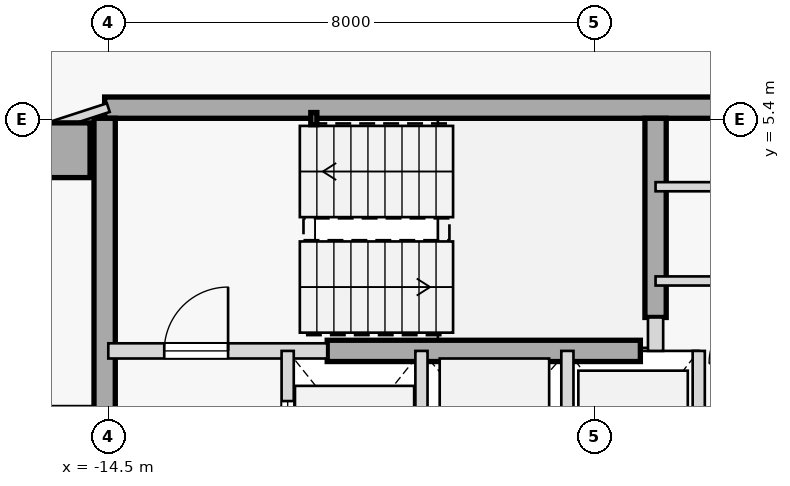
"""IFC4 building model, lengths in metres.
Left out: names, types, materials, properties, quantities, classifications, styles, units other than length and angle.
Written with IfcOpenShell. Run it as: python <this file> out.ifc"""

import sys

from ifc_helpers import new_model, si_unit, direction, frame, frame_2d, origin, origin_2d, place, context, subcontext, project, spatial, rectangle, hollow_rectangle, extrude, element, fill, save


model = new_model("IFC4")
c1 = context("Model", 3, precision=1e-05, world=origin(), true_north=direction((0.0, 1.0)))
c2 = subcontext(c1, "Body", "Model", "MODEL_VIEW")
j1 = project(units=[si_unit("LENGTHUNIT", "METRE"), si_unit("PLANEANGLEUNIT", "RADIAN")], contexts=[c1])
p1 = place(None, origin())
s1 = spatial("IfcSite", under=j1, at=p1, CompositionType="ELEMENT")
p2 = place(p1, origin())
s2 = spatial("IfcBuilding", under=s1, at=p2, CompositionType="ELEMENT")
p3 = place(p2, frame((0.0, 0.0, 210.9)))
s3 = spatial("IfcBuildingStorey", under=s2, at=p3, CompositionType="ELEMENT", Elevation=210.9)
p4 = place(p3, frame((-15.25, 4.9, 0.0), z_axis=(0.0, 0.0, 1.0), x_axis=(1.0, 0.0, 0.0)))
e1 = element("IfcColumn", 1, at=p4, inside=s3, PredefinedType="COLUMN", context=c2, shape_type="SweptSolid", body=[
    extrude(rectangle(XDim=0.9, YDim=0.9, at=origin_2d()), origin(), (0.0, 0.0, 1.0), 3.35),
])
p5 = place(p3, frame((-14.56, 5.6, 0.0), z_axis=(0.0, 0.0, 1.0), x_axis=(1.0, 0.0, 0.0)))
e2 = element("IfcWall", 2, at=p5, inside=s3, PredefinedType="SHEAR", context=c2, shape_type="SweptSolid", body=[
    extrude(rectangle(XDim=11.41, YDim=0.35, at=frame_2d((5.705, 0.0))), origin(), (0.0, 0.0, 1.0), 3.125),
])
p6 = place(p3, frame((-14.56, -5.425, 0.0), z_axis=(0.0, 0.0, 1.0), x_axis=(0.0, 1.0, 0.0)))
e3 = element("IfcWall", 3, at=p6, inside=s3, PredefinedType="SHEAR", context=c2, shape_type="SweptSolid", body=[
    extrude(rectangle(XDim=10.85, YDim=0.35, at=frame_2d((5.425, 0.0))), origin(), (0.0, 0.0, 1.0), 3.125),
])
p7 = place(p3, frame((-5.5, 2.15, 0.0), z_axis=(0.0, 0.0, 1.0), x_axis=(0.0, 1.0, 0.0)))
e4 = element("IfcWall", 4, at=p7, inside=s3, PredefinedType="SHEAR", context=c2, shape_type="SweptSolid", body=[
    extrude(rectangle(XDim=3.275, YDim=0.35, at=frame_2d((1.638, 0.0))), origin(), (0.0, 0.0, 1.0), 3.125),
])
p8 = place(p3, frame((-10.9, 1.6, 0.0), z_axis=(0.0, 0.0, 1.0), x_axis=(1.0, 0.0, 0.0)))
e5 = element("IfcWall", 5, at=p8, inside=s3, PredefinedType="SHEAR", context=c2, shape_type="SweptSolid", body=[
    extrude(rectangle(XDim=5.15, YDim=0.35, at=frame_2d((2.575, 0.0))), origin(), (0.0, 0.0, 1.0), 3.125),
])
p9 = place(p3, frame((-11.12, 5.42, 0.0), z_axis=(0.0, 0.0, 1.0), x_axis=(1.0, 0.0, 0.0)))
e6 = element("IfcColumn", 6, at=p9, inside=s3, PredefinedType="COLUMN", context=c2, shape_type="SweptSolid", body=[
    extrude(hollow_rectangle(XDim=0.1, YDim=0.2, WallThickness=0.008, at=origin_2d()), origin(), (0.0, 0.0, 1.0), 3.35),
])
p10 = place(p3, frame((-14.5, 1.6, 0.0), z_axis=(0.0, 0.0, 1.0), x_axis=(1.0, 0.0, 0.0)))
e7 = element("IfcWall", 7, at=p10, inside=s3, PredefinedType="STANDARD", context=c2, shape_type="SweptSolid", body=[
    extrude(rectangle(XDim=3.6, YDim=0.25, at=frame_2d((1.8, 0.0))), origin(), (0.0, 0.0, 1.0), 3.125),
])
p11 = place(p10, frame((0.92, 0.0, 0.0)))
e8 = element("IfcOpeningElement", 8, at=p11, cuts=e7, PredefinedType="OPENING", context=c2, shape_type="SweptSolid", body=[
    extrude(rectangle(XDim=1.05, YDim=2.15, at=frame_2d((0.525, 1.075))), frame((0.0, 0.135, 0.0), z_axis=(0.0, -1.0, 0.0), x_axis=(1.0, 0.0, 0.0)), (0.0, 0.0, 1.0), 0.27),
])
p12 = place(p3, frame((-5.5, 1.6, 0.0), z_axis=(0.0, 0.0, 1.0), x_axis=(0.0, 1.0, 0.0)))
e9 = element("IfcWall", 9, at=p12, inside=s3, PredefinedType="STANDARD", context=c2, shape_type="SweptSolid", body=[
    extrude(rectangle(XDim=0.55, YDim=0.25, at=frame_2d((0.275, 0.0))), origin(), (0.0, 0.0, 1.0), 3.125),
])
p13 = place(p3, frame((-11.55, -1.15, 0.0), z_axis=(0.0, 0.0, 1.0), x_axis=(0.0, 1.0, 0.0)))
e10 = element("IfcWall", 10, at=p13, inside=s3, PredefinedType="STANDARD", context=c2, shape_type="SweptSolid", body=[
    extrude(rectangle(XDim=2.75, YDim=0.2, at=frame_2d((1.375, 0.0))), origin(), (0.0, 0.0, 1.0), 3.125),
])
p14 = place(p13, frame((0.825, 0.0, 0.0)))
e11 = element("IfcOpeningElement", 11, at=p14, cuts=e10, PredefinedType="OPENING", context=c2, shape_type="SweptSolid", body=[
    extrude(rectangle(XDim=1.1, YDim=2.15, at=frame_2d((0.55, 1.075))), frame((0.0, 0.11, 0.0), z_axis=(0.0, -1.0, 0.0), x_axis=(1.0, 0.0, 0.0)), (0.0, 0.0, 1.0), 0.22),
])
for number, where, z_axis, x_axis in (
    (12, (-9.35, -1.15, 0.0), (0.0, 0.0, 1.0), (0.0, 1.0, 0.0)),
    (13, (-6.95, -1.15, 0.0), (0.0, 0.0, 1.0), (0.0, 1.0, 0.0)),
    (14, (-4.79, -1.15, 0.0), (0.0, 0.0, 1.0), (0.0, 1.0, 0.0)),
):
    element("IfcWall", number, at=place(p3, frame(where, z_axis=z_axis, x_axis=x_axis)), inside=s3, PredefinedType="STANDARD", context=c2, shape_type="SweptSolid", body=[
        extrude(rectangle(XDim=2.75, YDim=0.2, at=frame_2d((1.375, 0.0))), origin(), (0.0, 0.0, 1.0), 3.125),
    ])
for number, where, z_axis, x_axis in (
    (15, (-5.5, 4.3, 0.0), (0.0, 0.0, 1.0), (1.0, 0.0, 0.0)),
    (16, (-5.5, 2.75, 0.0), (0.0, 0.0, 1.0), (1.0, 0.0, 0.0)),
):
    element("IfcWall", number, at=place(p3, frame(where, z_axis=z_axis, x_axis=x_axis)), inside=s3, PredefinedType="PARTITIONING", context=c2, shape_type="SweptSolid", body=[
        extrude(rectangle(XDim=1.8, YDim=0.15, at=frame_2d((0.9, 0.0))), origin(), (0.0, 0.0, 1.0), 3.125),
    ])
p15 = place(p3, frame((-17.792, 4.531, 0.0), z_axis=(0.0, 0.0, 1.0), x_axis=(0.951047546178, 0.309044600193, 0.0)))
e17 = element("IfcWall", 17, at=p15, inside=s3, PredefinedType="PARTITIONING", context=c2, shape_type="SweptSolid", body=[
    extrude(rectangle(XDim=3.461, YDim=0.15, at=frame_2d((1.73, 0.0))), origin(), (0.0, 0.0, 1.0), 3.125),
])
p16 = place(p15, frame((0.302, 0.0, 0.0)))
e18 = element("IfcOpeningElement", 18, at=p16, cuts=e17, PredefinedType="OPENING", context=c2, shape_type="SweptSolid", body=[
    extrude(rectangle(XDim=0.92, YDim=2.15, at=frame_2d((0.46, 1.075))), frame((0.0, 0.085, 0.0), z_axis=(0.0, -1.0, 0.0), x_axis=(1.0, 0.0, 0.0)), (0.0, 0.0, 1.0), 0.17),
])
p17 = place(p3, frame((-18.292, 6.072, 0.0), z_axis=(0.0, 0.0, 1.0), x_axis=(0.951062707515, 0.30899793911, 0.0)))
e19 = element("IfcWall", 19, at=p17, inside=s3, PredefinedType="PARTITIONING", context=c2, shape_type="SweptSolid", body=[
    extrude(rectangle(XDim=6.076, YDim=0.15, at=frame_2d((3.038, 0.0))), origin(), (0.0, 0.0, 1.0), 3.125),
])
p18 = place(p17, frame((0.877, 0.0, 0.0)))
e20 = element("IfcOpeningElement", 20, at=p18, cuts=e19, PredefinedType="OPENING", context=c2, shape_type="SweptSolid", body=[
    extrude(rectangle(XDim=0.92, YDim=2.15, at=frame_2d((0.46, 1.075))), frame((0.0, 0.085, 0.0), z_axis=(0.0, -1.0, 0.0), x_axis=(1.0, 0.0, 0.0)), (0.0, 0.0, 1.0), 0.17),
])
p19 = place(p11, origin())
e21 = element("IfcDoor", 21, at=p19, inside=s3, OperationType="SINGLE_SWING_RIGHT", PredefinedType="DOOR", context=c2, shape_type="SweptSolid", body=[
    extrude(rectangle(XDim=1.05, YDim=2.15, at=frame_2d((0.525, 1.075))), frame((0.0, 0.025, 0.0), z_axis=(0.0, -1.0, 0.0), x_axis=(1.0, 0.0, 0.0)), (0.0, 0.0, 1.0), 0.05),
])
fill(e8, e21)
p20 = place(p14, origin())
e22 = element("IfcDoor", 22, at=p20, inside=s3, OperationType="SLIDING_TO_RIGHT", PredefinedType="DOOR", context=c2, shape_type="SweptSolid", body=[
    extrude(rectangle(XDim=1.1, YDim=2.15, at=frame_2d((0.55, 1.075))), frame((0.0, 0.025, 0.0), z_axis=(0.0, -1.0, 0.0), x_axis=(1.0, 0.0, 0.0)), (0.0, 0.0, 1.0), 0.05),
])
fill(e11, e22)
save(model, sys.argv[1])
